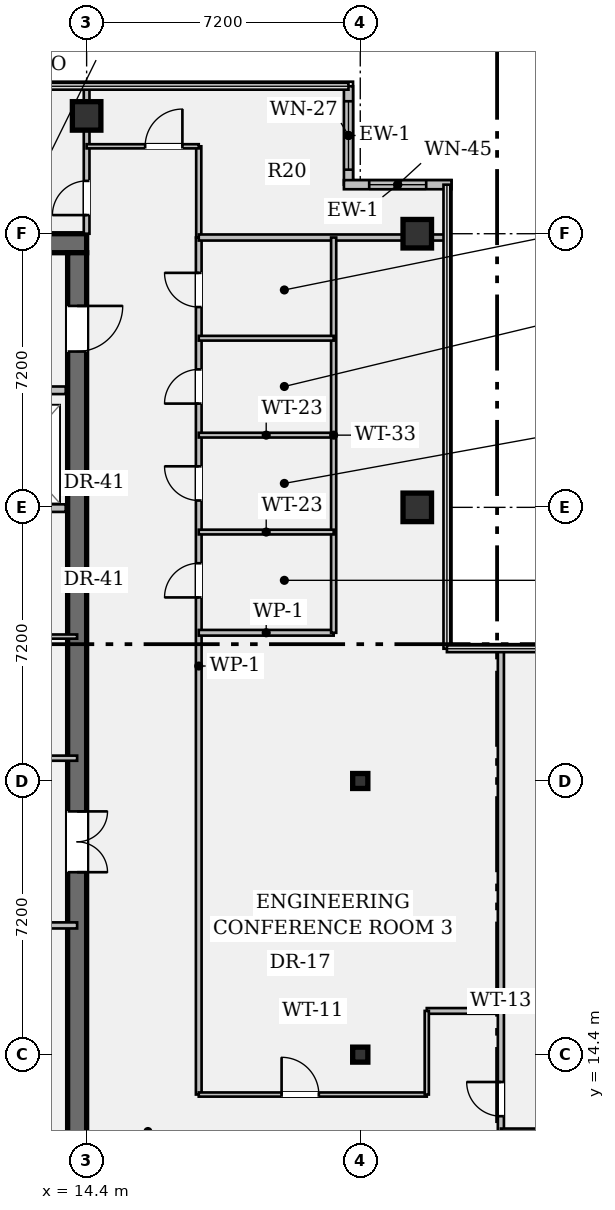
"""IFC4 building model, lengths in metres.
Left out: names, types, materials, properties, quantities, classifications, styles, units other than length and angle.
Written with IfcOpenShell. Run it as: python <this file> out.ifc"""

import sys

from ifc_helpers import new_model, si_unit, direction, frame, frame_2d, origin, origin_2d, place, context, subcontext, project, spatial, rectangle, hollow_rectangle, i_section, extrude, element, fill, save


model = new_model("IFC4")
c1 = context("Model", 3, precision=1e-05, world=origin(), true_north=direction((0.0, 1.0)))
c2 = subcontext(c1, "Body", "Model", "MODEL_VIEW")
j1 = project(units=[si_unit("LENGTHUNIT", "METRE"), si_unit("PLANEANGLEUNIT", "RADIAN")], contexts=[c1])
p1 = place(None, origin())
s1 = spatial("IfcSite", under=j1, at=p1, CompositionType="ELEMENT")
p2 = place(p1, origin())
s2 = spatial("IfcBuilding", under=s1, at=p2, CompositionType="ELEMENT")
p3 = place(p2, frame((0.0, 0.0, 204.75)))
s3 = spatial("IfcBuildingStorey", under=s2, at=p3, CompositionType="ELEMENT", Elevation=204.75)
p4 = place(p3, frame((0.5, 35.75, 0.0), z_axis=(0.0, 0.0, 1.0), x_axis=(1.0, 0.0, 0.0)))
e1 = element("IfcWall", 1, at=p4, inside=s3, PredefinedType="SHEAR", context=c2, shape_type="SweptSolid", body=[
    extrude(rectangle(XDim=13.9, YDim=0.5, at=frame_2d((6.95, 0.0))), origin(), (0.0, 0.0, 1.0), 3.24),
])
p5 = place(p3, frame((14.15, 35.5, 0.0), z_axis=(0.0, 0.0, 1.0), x_axis=(0.0, -1.0, 0.0)))
e2 = element("IfcWall", 2, at=p5, inside=s3, PredefinedType="SHEAR", context=c2, shape_type="SweptSolid", body=[
    extrude(rectangle(XDim=27.8, YDim=0.5, at=frame_2d((13.9, 0.0))), origin(), (0.0, 0.0, 1.0), 3.24),
])
p6 = place(p5, frame((1.4, 0.0, 0.0)))
e3 = element("IfcOpeningElement", 3, at=p6, cuts=e2, PredefinedType="OPENING", context=c2, shape_type="SweptSolid", body=[
    extrude(rectangle(XDim=1.2, YDim=2.15, at=frame_2d((0.6, 1.075))), frame((0.0, 0.262, 0.0), z_axis=(0.0, -1.0, 0.0), x_axis=(1.0, 0.0, 0.0)), (0.0, 0.0, 1.0), 0.524),
])
p7 = place(p5, frame((25.35, 0.0, 0.0)))
e4 = element("IfcOpeningElement", 4, at=p7, cuts=e2, PredefinedType="OPENING", context=c2, shape_type="SweptSolid", body=[
    extrude(rectangle(XDim=1.2, YDim=2.15, at=frame_2d((0.6, 1.075))), frame((0.0, 0.262, 0.0), z_axis=(0.0, -1.0, 0.0), x_axis=(1.0, 0.0, 0.0)), (0.0, 0.0, 1.0), 0.524),
])
p8 = place(p5, frame((14.7, 0.0, 0.0)))
e5 = element("IfcOpeningElement", 5, at=p8, cuts=e2, PredefinedType="OPENING", context=c2, shape_type="SweptSolid", body=[
    extrude(rectangle(XDim=1.6, YDim=2.2, at=frame_2d((0.8, 1.1))), frame((0.0, 0.262, 0.0), z_axis=(0.0, -1.0, 0.0), x_axis=(1.0, 0.0, 0.0)), (0.0, 0.0, 1.0), 0.524),
])
p9 = place(p3, frame((14.4, 39.1, 0.0), z_axis=(0.0, 0.0, 1.0), x_axis=(1.0, 0.0, 0.0)))
e6 = element("IfcColumn", 6, at=p9, inside=s3, PredefinedType="COLUMN", context=c2, shape_type="SweptSolid", body=[
    extrude(hollow_rectangle(XDim=0.75, YDim=0.75, WallThickness=0.045, at=origin_2d()), origin(), (0.0, 0.0, 1.0), 3.24),
])
for number, where, z_axis, x_axis in (
    (7, (21.6, 14.4, 0.0), (0.0, 0.0, 1.0), (1.0, 0.0, 0.0)),
    (8, (21.6, 21.6, 0.0), (0.0, 0.0, 1.0), (1.0, 0.0, 0.0)),
):
    element("IfcColumn", number, at=place(p3, frame(where, z_axis=z_axis, x_axis=x_axis)), inside=s3, PredefinedType="COLUMN", context=c2, shape_type="SweptSolid", body=[
        extrude(i_section(OverallWidth=0.399, OverallDepth=0.394, WebThickness=0.023, FlangeThickness=0.037, FilletRadius=0.018, at=origin_2d()), origin(), (0.0, 0.0, 1.0), 3.24),
    ])
for number, where, z_axis, x_axis in (
    (9, (23.1, 28.8, 0.0), (0.0, 0.0, 1.0), (1.0, 0.0, 0.0)),
    (10, (23.1, 36.0, 0.0), (0.0, 0.0, 1.0), (1.0, 0.0, 0.0)),
):
    element("IfcColumn", number, at=place(p3, frame(where, z_axis=z_axis, x_axis=x_axis)), inside=s3, PredefinedType="COLUMN", context=c2, shape_type="SweptSolid", body=[
        extrude(hollow_rectangle(XDim=0.75, YDim=0.75, WallThickness=0.045, at=origin_2d()), origin(), (0.0, 0.0, 1.0), 3.24),
    ])
p10 = place(p3, frame((21.29, 39.88, 0.0), z_axis=(0.0, 0.0, 1.0), x_axis=(0.0, -1.0, 0.0)))
e11 = element("IfcWall", 11, at=p10, inside=s3, PredefinedType="STANDARD", context=c2, shape_type="SweptSolid", body=[
    extrude(rectangle(XDim=2.59, YDim=0.24, at=frame_2d((1.295, 0.0))), origin(), (0.0, 0.0, 1.0), 3.24),
])
p11 = place(p10, frame((0.395, 0.0, 0.95)))
e12 = element("IfcOpeningElement", 12, at=p11, cuts=e11, PredefinedType="OPENING", context=c2, shape_type="SweptSolid", body=[
    extrude(rectangle(XDim=1.8, YDim=1.35, at=frame_2d((0.9, 0.675))), frame((0.0, 0.132, 0.0), z_axis=(0.0, -1.0, 0.0), x_axis=(1.0, 0.0, 0.0)), (0.0, 0.0, 1.0), 0.264),
])
p12 = place(p3, frame((21.17, 37.29, 0.0), z_axis=(0.0, 0.0, 1.0), x_axis=(1.0, 0.0, 0.0)))
e13 = element("IfcWall", 13, at=p12, inside=s3, PredefinedType="STANDARD", context=c2, shape_type="SweptSolid", body=[
    extrude(rectangle(XDim=2.83, YDim=0.24, at=frame_2d((1.415, 0.0))), origin(), (0.0, 0.0, 1.0), 3.24),
])
p13 = place(p12, frame((0.665, 0.0, 0.95)))
e14 = element("IfcOpeningElement", 14, at=p13, cuts=e13, PredefinedType="OPENING", context=c2, shape_type="SweptSolid", body=[
    extrude(rectangle(XDim=1.5, YDim=1.8, at=frame_2d((0.75, 0.9))), frame((0.0, 0.132, 0.0), z_axis=(0.0, -1.0, 0.0), x_axis=(1.0, 0.0, 0.0)), (0.0, 0.0, 1.0), 0.264),
])
p14 = place(p3, frame((8.7, 31.88, 0.0), z_axis=(0.0, 0.0, 1.0), x_axis=(1.0, 0.0, 0.0)))
e15 = element("IfcWall", 15, at=p14, inside=s3, PredefinedType="PARTITIONING", context=c2, shape_type="SweptSolid", body=[
    extrude(rectangle(XDim=5.15, YDim=0.2, at=frame_2d((2.575, 0.0))), origin(), (0.0, 0.0, 1.0), 3.24),
])
p15 = place(p14, frame((0.75, 0.0, 0.0)))
e16 = element("IfcOpeningElement", 16, at=p15, cuts=e15, PredefinedType="OPENING", context=c2, shape_type="SweptSolid", body=[
    extrude(rectangle(XDim=1.2, YDim=2.2, at=frame_2d((0.6, 1.1))), frame((0.0, 0.112, 0.0), z_axis=(0.0, -1.0, 0.0), x_axis=(1.0, 0.0, 0.0)), (0.0, 0.0, 1.0), 0.224),
])
p16 = place(p14, frame((3.25, 0.0, 0.0)))
e17 = element("IfcOpeningElement", 17, at=p16, cuts=e15, PredefinedType="OPENING", context=c2, shape_type="SweptSolid", body=[
    extrude(rectangle(XDim=1.2, YDim=2.2, at=frame_2d((0.6, 1.1))), frame((0.0, 0.112, 0.0), z_axis=(0.0, -1.0, 0.0), x_axis=(1.0, 0.0, 0.0)), (0.0, 0.0, 1.0), 0.224),
])
p17 = place(p3, frame((8.7, 28.78, 0.0), z_axis=(0.0, 0.0, 1.0), x_axis=(1.0, 0.0, 0.0)))
e18 = element("IfcWall", 18, at=p17, inside=s3, PredefinedType="PARTITIONING", context=c2, shape_type="SweptSolid", body=[
    extrude(rectangle(XDim=5.15, YDim=0.2, at=frame_2d((2.575, 0.0))), origin(), (0.0, 0.0, 1.0), 3.24),
])
p18 = place(p3, frame((7.1, 22.2, 0.0), z_axis=(0.0, 0.0, 1.0), x_axis=(1.0, 0.0, 0.0)))
e19 = element("IfcWall", 19, at=p18, inside=s3, PredefinedType="PARTITIONING", context=c2, shape_type="SweptSolid", body=[
    extrude(rectangle(XDim=7.05, YDim=0.135, at=frame_2d((3.525, 0.0))), origin(), (0.0, 0.0, 1.0), 3.24),
])
p19 = place(p3, frame((7.1, 25.4, 0.0), z_axis=(0.0, 0.0, 1.0), x_axis=(1.0, 0.0, 0.0)))
e20 = element("IfcWall", 20, at=p19, inside=s3, PredefinedType="PARTITIONING", context=c2, shape_type="SweptSolid", body=[
    extrude(rectangle(XDim=7.05, YDim=0.11, at=frame_2d((3.525, 0.0))), origin(), (0.0, 0.0, 1.0), 3.24),
])
p20 = place(p3, frame((5.15, 17.8, 0.0), z_axis=(0.0, 0.0, 1.0), x_axis=(1.0, 0.0, 0.0)))
e21 = element("IfcWall", 21, at=p20, inside=s3, PredefinedType="PARTITIONING", context=c2, shape_type="SweptSolid", body=[
    extrude(rectangle(XDim=9.0, YDim=0.16, at=frame_2d((4.5, 0.0))), origin(), (0.0, 0.0, 1.0), 3.24),
])
p21 = place(p20, frame((4.35, 0.0, 0.0)))
e22 = element("IfcOpeningElement", 22, at=p21, cuts=e21, PredefinedType="OPENING", context=c2, shape_type="SweptSolid", body=[
    extrude(rectangle(XDim=1.0, YDim=2.15, at=frame_2d((0.5, 1.075))), frame((0.0, 0.092, 0.0), z_axis=(0.0, -1.0, 0.0), x_axis=(1.0, 0.0, 0.0)), (0.0, 0.0, 1.0), 0.184),
])
p22 = place(p3, frame((17.35, 13.35, 0.0), z_axis=(0.0, 0.0, 1.0), x_axis=(0.0, 1.0, 0.0)))
e23 = element("IfcWall", 23, at=p22, inside=s3, PredefinedType="PARTITIONING", context=c2, shape_type="SweptSolid", body=[
    extrude(rectangle(XDim=22.55, YDim=0.15, at=frame_2d((11.275, 0.0))), origin(), (0.0, 0.0, 1.0), 2.613),
])
p23 = place(p22, frame((13.08, 0.0, 0.0)))
e24 = element("IfcOpeningElement", 24, at=p23, cuts=e23, PredefinedType="OPENING", context=c2, shape_type="SweptSolid", body=[
    extrude(rectangle(XDim=0.9, YDim=2.15, at=frame_2d((0.45, 1.075))), frame((0.0, 0.087, 0.0), z_axis=(0.0, -1.0, 0.0), x_axis=(1.0, 0.0, 0.0)), (0.0, 0.0, 1.0), 0.174),
])
p24 = place(p22, frame((15.63, 0.0, 0.0)))
e25 = element("IfcOpeningElement", 25, at=p24, cuts=e23, PredefinedType="OPENING", context=c2, shape_type="SweptSolid", body=[
    extrude(rectangle(XDim=0.9, YDim=2.15, at=frame_2d((0.45, 1.075))), frame((0.0, 0.087, 0.0), z_axis=(0.0, -1.0, 0.0), x_axis=(1.0, 0.0, 0.0)), (0.0, 0.0, 1.0), 0.174),
])
p25 = place(p22, frame((18.18, 0.0, 0.0)))
e26 = element("IfcOpeningElement", 26, at=p25, cuts=e23, PredefinedType="OPENING", context=c2, shape_type="SweptSolid", body=[
    extrude(rectangle(XDim=0.9, YDim=2.15, at=frame_2d((0.45, 1.075))), frame((0.0, 0.087, 0.0), z_axis=(0.0, -1.0, 0.0), x_axis=(1.0, 0.0, 0.0)), (0.0, 0.0, 1.0), 0.174),
])
p26 = place(p22, frame((20.72, 0.0, 0.0)))
e27 = element("IfcOpeningElement", 27, at=p26, cuts=e23, PredefinedType="OPENING", context=c2, shape_type="SweptSolid", body=[
    extrude(rectangle(XDim=0.9, YDim=2.15, at=frame_2d((0.45, 1.075))), frame((0.0, 0.087, 0.0), z_axis=(0.0, -1.0, 0.0), x_axis=(1.0, 0.0, 0.0)), (0.0, 0.0, 1.0), 0.174),
])
p27 = place(p3, frame((17.35, 13.35, 0.0), z_axis=(0.0, 0.0, 1.0), x_axis=(1.0, 0.0, 0.0)))
e28 = element("IfcWall", 28, at=p27, inside=s3, PredefinedType="PARTITIONING", context=c2, shape_type="SweptSolid", body=[
    extrude(rectangle(XDim=6.0, YDim=0.11, at=frame_2d((3.0, 0.0))), origin(), (0.0, 0.0, 1.0), 2.613),
])
p28 = place(p27, frame((2.18, 0.0, 0.0)))
e29 = element("IfcOpeningElement", 29, at=p28, cuts=e28, PredefinedType="OPENING", context=c2, shape_type="SweptSolid", body=[
    extrude(rectangle(XDim=0.98, YDim=2.15, at=frame_2d((0.49, 1.075))), frame((0.0, 0.067, 0.0), z_axis=(0.0, -1.0, 0.0), x_axis=(1.0, 0.0, 0.0)), (0.0, 0.0, 1.0), 0.134),
])
p29 = place(p3, frame((23.35, 15.55, 0.0), z_axis=(0.0, 0.0, 1.0), x_axis=(1.0, 0.0, 0.0)))
e30 = element("IfcWall", 30, at=p29, inside=s3, PredefinedType="PARTITIONING", context=c2, shape_type="SweptSolid", body=[
    extrude(rectangle(XDim=1.95, YDim=0.15, at=frame_2d((0.975, 0.0))), origin(), (0.0, 0.0, 1.0), 2.808),
])
p30 = place(p3, frame((23.35, 13.35, 0.0), z_axis=(0.0, 0.0, 1.0), x_axis=(0.0, 1.0, 0.0)))
e31 = element("IfcWall", 31, at=p30, inside=s3, PredefinedType="PARTITIONING", context=c2, shape_type="SweptSolid", body=[
    extrude(rectangle(XDim=2.2, YDim=0.11, at=frame_2d((1.1, 0.0))), origin(), (0.0, 0.0, 1.0), 2.613),
])
p31 = place(p3, frame((25.3, 3.32, 0.0), z_axis=(0.0, 0.0, 1.0), x_axis=(0.0, 1.0, 0.0)))
e32 = element("IfcWall", 32, at=p31, inside=s3, PredefinedType="PARTITIONING", context=c2, shape_type="SweptSolid", body=[
    extrude(rectangle(XDim=21.76, YDim=0.16, at=frame_2d((10.88, 0.0))), origin(), (0.0, 0.0, 1.0), 2.613),
])
p32 = place(p31, frame((7.79, 0.0, 0.0)))
e33 = element("IfcOpeningElement", 33, at=p32, cuts=e32, PredefinedType="OPENING", context=c2, shape_type="SweptSolid", body=[
    extrude(rectangle(XDim=0.9, YDim=2.15, at=frame_2d((0.45, 1.075))), frame((0.0, 0.092, 0.0), z_axis=(0.0, -1.0, 0.0), x_axis=(1.0, 0.0, 0.0)), (0.0, 0.0, 1.0), 0.184),
])
p33 = place(p31, frame((9.46, 0.0, 0.0)))
e34 = element("IfcOpeningElement", 34, at=p33, cuts=e32, PredefinedType="OPENING", context=c2, shape_type="SweptSolid", body=[
    extrude(rectangle(XDim=0.9, YDim=2.15, at=frame_2d((0.45, 1.075))), frame((0.0, 0.092, 0.0), z_axis=(0.0, -1.0, 0.0), x_axis=(1.0, 0.0, 0.0)), (0.0, 0.0, 1.0), 0.184),
])
p34 = place(p3, frame((14.4, 36.0, 0.0), z_axis=(0.0, 0.0, 1.0), x_axis=(0.0, 1.0, 0.0)))
e35 = element("IfcWall", 35, at=p34, inside=s3, PredefinedType="PARTITIONING", context=c2, shape_type="SweptSolid", body=[
    extrude(rectangle(XDim=3.88, YDim=0.15, at=frame_2d((1.94, 0.0))), origin(), (0.0, 0.0, 1.0), 2.613),
])
p35 = place(p34, frame((0.49, 0.0, 0.0)))
e36 = element("IfcOpeningElement", 36, at=p35, cuts=e35, PredefinedType="OPENING", context=c2, shape_type="SweptSolid", body=[
    extrude(rectangle(XDim=0.9, YDim=2.15, at=frame_2d((0.45, 1.075))), frame((0.0, 0.087, 0.0), z_axis=(0.0, -1.0, 0.0), x_axis=(1.0, 0.0, 0.0)), (0.0, 0.0, 1.0), 0.174),
])
p36 = place(p3, frame((17.35, 35.9, 0.0), z_axis=(0.0, 0.0, 1.0), x_axis=(0.0, 1.0, 0.0)))
e37 = element("IfcWall", 37, at=p36, inside=s3, PredefinedType="PARTITIONING", context=c2, shape_type="SweptSolid", body=[
    extrude(rectangle(XDim=2.4, YDim=0.135, at=frame_2d((1.2, 0.0))), origin(), (0.0, 0.0, 1.0), 2.613),
])
p37 = place(p3, frame((14.4, 38.3, 0.0), z_axis=(0.0, 0.0, 1.0), x_axis=(1.0, 0.0, 0.0)))
e38 = element("IfcWall", 38, at=p37, inside=s3, PredefinedType="PARTITIONING", context=c2, shape_type="SweptSolid", body=[
    extrude(rectangle(XDim=2.95, YDim=0.11, at=frame_2d((1.475, 0.0))), origin(), (0.0, 0.0, 1.0), 3.24),
])
p38 = place(p37, frame((1.54, 0.0, 0.0)))
e39 = element("IfcOpeningElement", 39, at=p38, cuts=e38, PredefinedType="OPENING", context=c2, shape_type="SweptSolid", body=[
    extrude(rectangle(XDim=0.98, YDim=2.15, at=frame_2d((0.49, 1.075))), frame((0.0, 0.067, 0.0), z_axis=(0.0, -1.0, 0.0), x_axis=(1.0, 0.0, 0.0)), (0.0, 0.0, 1.0), 0.134),
])
p39 = place(p3, frame((17.35, 35.9, 0.0), z_axis=(0.0, 0.0, 1.0), x_axis=(1.0, 0.0, 0.0)))
e40 = element("IfcWall", 40, at=p39, inside=s3, PredefinedType="PARTITIONING", context=c2, shape_type="SweptSolid", body=[
    extrude(rectangle(XDim=6.53, YDim=0.16, at=frame_2d((3.265, 0.0))), origin(), (0.0, 0.0, 1.0), 2.613),
])
p40 = place(p3, frame((17.35, 25.5, 0.0), z_axis=(0.0, 0.0, 1.0), x_axis=(1.0, 0.0, 0.0)))
e41 = element("IfcWall", 41, at=p40, inside=s3, PredefinedType="PARTITIONING", context=c2, shape_type="SweptSolid", body=[
    extrude(rectangle(XDim=3.55, YDim=0.15, at=frame_2d((1.775, 0.0))), origin(), (0.0, 0.0, 1.0), 2.808),
])
p41 = place(p3, frame((20.9, 25.5, 0.0), z_axis=(0.0, 0.0, 1.0), x_axis=(0.0, 1.0, 0.0)))
e42 = element("IfcWall", 42, at=p41, inside=s3, PredefinedType="PARTITIONING", context=c2, shape_type="SweptSolid", body=[
    extrude(rectangle(XDim=10.4, YDim=0.135, at=frame_2d((5.2, 0.0))), origin(), (0.0, 0.0, 1.0), 2.613),
])
for number, where, z_axis, x_axis in (
    (43, (17.35, 28.15, 0.0), (0.0, 0.0, 1.0), (1.0, 0.0, 0.0)),
    (44, (17.35, 30.7, 0.0), (0.0, 0.0, 1.0), (1.0, 0.0, 0.0)),
    (45, (17.35, 33.25, 0.0), (0.0, 0.0, 1.0), (1.0, 0.0, 0.0)),
):
    element("IfcWall", number, at=place(p3, frame(where, z_axis=z_axis, x_axis=x_axis)), inside=s3, PredefinedType="PARTITIONING", context=c2, shape_type="SweptSolid", body=[
        extrude(rectangle(XDim=3.55, YDim=0.125, at=frame_2d((1.775, 0.0))), origin(), (0.0, 0.0, 1.0), 2.808),
    ])
p42 = place(p3, frame((25.3, 12.4, 0.0), z_axis=(0.0, 0.0, 1.0), x_axis=(1.0, 0.0, 0.0)))
e46 = element("IfcWall", 46, at=p42, inside=s3, PredefinedType="PARTITIONING", context=c2, shape_type="SweptSolid", body=[
    extrude(rectangle(XDim=18.58, YDim=0.11, at=frame_2d((9.29, 0.0))), origin(), (0.0, 0.0, 1.0), 2.613),
])
p43 = place(p11, origin())
e47 = element("IfcWindow", 47, at=p43, inside=s3, PartitioningType="SINGLE_PANEL", PredefinedType="WINDOW", context=c2, shape_type="SweptSolid", body=[
    extrude(rectangle(XDim=1.8, YDim=1.35, at=frame_2d((0.9, 0.675))), frame((0.0, 0.03, 0.0), z_axis=(0.0, -1.0, 0.0), x_axis=(1.0, 0.0, 0.0)), (0.0, 0.0, 1.0), 0.06),
])
fill(e12, e47)
p44 = place(p13, origin())
e48 = element("IfcWindow", 48, at=p44, inside=s3, PartitioningType="SINGLE_PANEL", PredefinedType="WINDOW", context=c2, shape_type="SweptSolid", body=[
    extrude(rectangle(XDim=1.5, YDim=1.8, at=frame_2d((0.75, 0.9))), frame((0.0, 0.03, 0.0), z_axis=(0.0, -1.0, 0.0), x_axis=(1.0, 0.0, 0.0)), (0.0, 0.0, 1.0), 0.06),
])
fill(e14, e48)
p45 = place(p6, origin())
e49 = element("IfcDoor", 49, at=p45, inside=s3, OperationType="SINGLE_SWING_LEFT", PredefinedType="DOOR", context=c2, shape_type="SweptSolid", body=[
    extrude(rectangle(XDim=1.2, YDim=2.15, at=frame_2d((0.6, 1.075))), frame((0.0, 0.025, 0.0), z_axis=(0.0, -1.0, 0.0), x_axis=(1.0, 0.0, 0.0)), (0.0, 0.0, 1.0), 0.05),
])
fill(e3, e49)
p46 = place(p8, origin())
e50 = element("IfcDoor", 50, at=p46, inside=s3, OperationType="DOUBLE_DOOR_SINGLE_SWING", PredefinedType="DOOR", context=c2, shape_type="SweptSolid", body=[
    extrude(rectangle(XDim=1.6, YDim=2.2, at=frame_2d((0.8, 1.1))), frame((0.0, 0.025, 0.0), z_axis=(0.0, -1.0, 0.0), x_axis=(1.0, 0.0, 0.0)), (0.0, 0.0, 1.0), 0.05),
])
fill(e5, e50)
p47 = place(p35, origin())
e51 = element("IfcDoor", 51, at=p47, inside=s3, OperationType="SINGLE_SWING_LEFT", PredefinedType="DOOR", context=c2, shape_type="SweptSolid", body=[
    extrude(rectangle(XDim=0.9, YDim=2.15, at=frame_2d((0.45, 1.075))), frame((0.0, 0.025, 0.0), z_axis=(0.0, -1.0, 0.0), x_axis=(1.0, 0.0, 0.0)), (0.0, 0.0, 1.0), 0.05),
])
fill(e36, e51)
p48 = place(p38, origin())
e52 = element("IfcDoor", 52, at=p48, inside=s3, OperationType="SINGLE_SWING_RIGHT", PredefinedType="DOOR", context=c2, shape_type="SweptSolid", body=[
    extrude(rectangle(XDim=0.98, YDim=2.15, at=frame_2d((0.49, 1.075))), frame((0.0, 0.025, 0.0), z_axis=(0.0, -1.0, 0.0), x_axis=(1.0, 0.0, 0.0)), (0.0, 0.0, 1.0), 0.05),
])
fill(e39, e52)
p49 = place(p23, origin())
e53 = element("IfcDoor", 53, at=p49, inside=s3, OperationType="SINGLE_SWING_LEFT", PredefinedType="DOOR", context=c2, shape_type="SweptSolid", body=[
    extrude(rectangle(XDim=0.9, YDim=2.15, at=frame_2d((0.45, 1.075))), frame((0.0, 0.025, 0.0), z_axis=(0.0, -1.0, 0.0), x_axis=(1.0, 0.0, 0.0)), (0.0, 0.0, 1.0), 0.05),
])
fill(e24, e53)
p50 = place(p24, origin())
e54 = element("IfcDoor", 54, at=p50, inside=s3, OperationType="SINGLE_SWING_RIGHT", PredefinedType="DOOR", context=c2, shape_type="SweptSolid", body=[
    extrude(rectangle(XDim=0.9, YDim=2.15, at=frame_2d((0.45, 1.075))), frame((0.0, 0.025, 0.0), z_axis=(0.0, -1.0, 0.0), x_axis=(1.0, 0.0, 0.0)), (0.0, 0.0, 1.0), 0.05),
])
fill(e25, e54)
p51 = place(p25, origin())
e55 = element("IfcDoor", 55, at=p51, inside=s3, OperationType="SINGLE_SWING_LEFT", PredefinedType="DOOR", context=c2, shape_type="SweptSolid", body=[
    extrude(rectangle(XDim=0.9, YDim=2.15, at=frame_2d((0.45, 1.075))), frame((0.0, 0.025, 0.0), z_axis=(0.0, -1.0, 0.0), x_axis=(1.0, 0.0, 0.0)), (0.0, 0.0, 1.0), 0.05),
])
fill(e26, e55)
p52 = place(p26, origin())
e56 = element("IfcDoor", 56, at=p52, inside=s3, OperationType="SINGLE_SWING_RIGHT", PredefinedType="DOOR", context=c2, shape_type="SweptSolid", body=[
    extrude(rectangle(XDim=0.9, YDim=2.15, at=frame_2d((0.45, 1.075))), frame((0.0, 0.025, 0.0), z_axis=(0.0, -1.0, 0.0), x_axis=(1.0, 0.0, 0.0)), (0.0, 0.0, 1.0), 0.05),
])
fill(e27, e56)
p53 = place(p28, origin())
e57 = element("IfcDoor", 57, at=p53, inside=s3, OperationType="SINGLE_SWING_LEFT", PredefinedType="DOOR", context=c2, shape_type="SweptSolid", body=[
    extrude(rectangle(XDim=0.98, YDim=2.15, at=frame_2d((0.49, 1.075))), frame((0.0, 0.025, 0.0), z_axis=(0.0, -1.0, 0.0), x_axis=(1.0, 0.0, 0.0)), (0.0, 0.0, 1.0), 0.05),
])
fill(e29, e57)
p54 = place(p33, origin())
e58 = element("IfcDoor", 58, at=p54, inside=s3, OperationType="SINGLE_SWING_RIGHT", PredefinedType="DOOR", context=c2, shape_type="SweptSolid", body=[
    extrude(rectangle(XDim=0.9, YDim=2.15, at=frame_2d((0.45, 1.075))), frame((0.0, 0.025, 0.0), z_axis=(0.0, -1.0, 0.0), x_axis=(1.0, 0.0, 0.0)), (0.0, 0.0, 1.0), 0.05),
])
fill(e34, e58)
save(model, sys.argv[1])
